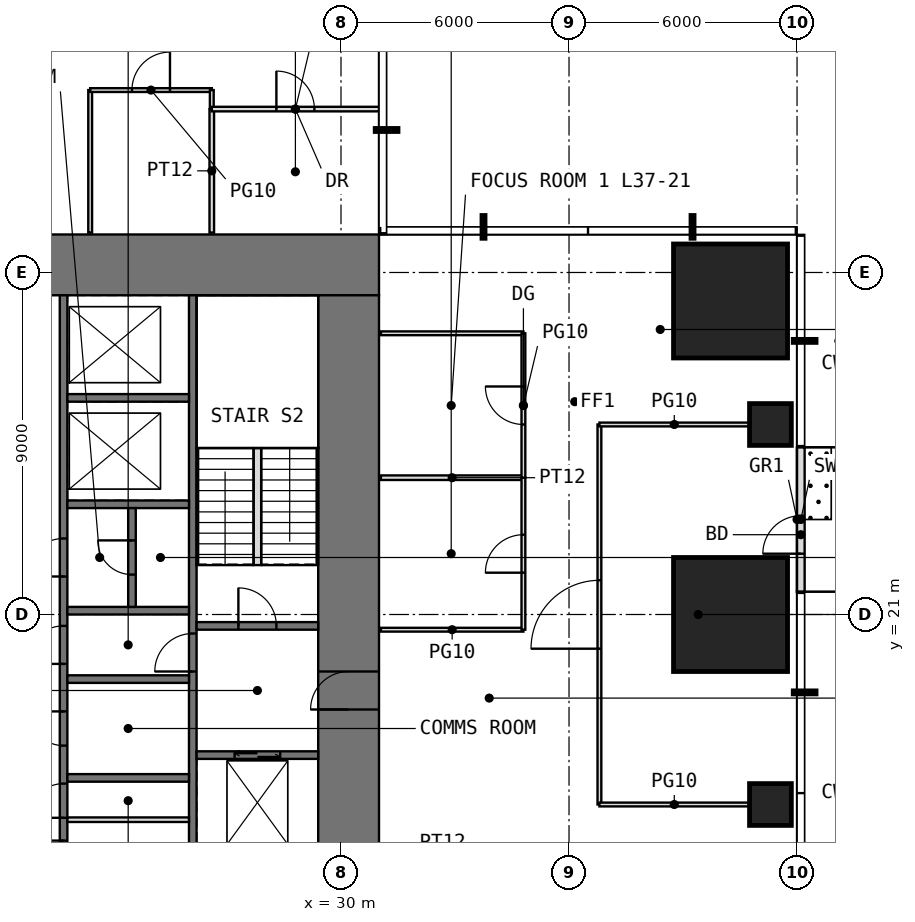
"""IFC4 building model, lengths in metres.
Left out: names, types, materials, properties, quantities, classifications, styles, units other than length and angle.
Written with IfcOpenShell. Run it as: python <this file> out.ifc"""

import sys

from ifc_helpers import new_model, si_unit, direction, frame, frame_2d, origin, origin_2d, place, context, subcontext, project, spatial, rectangle, extrude, element, fill, save


model = new_model("IFC4")
c1 = context("Model", 3, precision=1e-05, world=origin(), true_north=direction((0.0, 1.0)))
c2 = subcontext(c1, "Body", "Model", "MODEL_VIEW")
j1 = project(units=[si_unit("LENGTHUNIT", "METRE"), si_unit("PLANEANGLEUNIT", "RADIAN")], contexts=[c1])
p1 = place(None, origin())
s1 = spatial("IfcSite", under=j1, at=p1, CompositionType="ELEMENT")
p2 = place(p1, origin())
s2 = spatial("IfcBuilding", under=s1, at=p2, CompositionType="ELEMENT")
p3 = place(p2, frame((0.0, 0.0, 156.5)))
s3 = spatial("IfcBuildingStorey", under=s2, at=p3, CompositionType="ELEMENT", Elevation=156.5)
p4 = place(p3, frame((41.3, 16.0, 0.0), z_axis=(0.0, 0.0, 1.0), x_axis=(1.0, 0.0, 0.0)))
e1 = element("IfcColumn", 1, at=p4, inside=s3, PredefinedType="COLUMN", context=c2, shape_type="SweptSolid", body=[
    extrude(rectangle(XDim=1.1, YDim=1.1, at=origin_2d()), origin(), (0.0, 0.0, 1.0), 4.0),
])
p5 = place(p3, frame((40.25, 21.0, 0.0), z_axis=(0.0, 0.0, 1.0), x_axis=(1.0, 0.0, 0.0)))
e2 = element("IfcColumn", 2, at=p5, inside=s3, PredefinedType="COLUMN", context=c2, shape_type="SweptSolid", body=[
    extrude(rectangle(XDim=3.0, YDim=3.0, at=origin_2d()), origin(), (0.0, 0.0, 1.0), 4.0),
])
p6 = place(p3, frame((41.3, 26.0, 0.0), z_axis=(0.0, 0.0, 1.0), x_axis=(1.0, 0.0, 0.0)))
e3 = element("IfcColumn", 3, at=p6, inside=s3, PredefinedType="COLUMN", context=c2, shape_type="SweptSolid", body=[
    extrude(rectangle(XDim=1.1, YDim=1.1, at=origin_2d()), origin(), (0.0, 0.0, 1.0), 4.0),
])
p7 = place(p3, frame((40.25, 29.25, 0.0), z_axis=(0.0, 0.0, 1.0), x_axis=(1.0, 0.0, 0.0)))
e4 = element("IfcColumn", 4, at=p7, inside=s3, PredefinedType="COLUMN", context=c2, shape_type="SweptSolid", body=[
    extrude(rectangle(XDim=3.0, YDim=3.0, at=origin_2d()), origin(), (0.0, 0.0, 1.0), 4.0),
])
p8 = place(p3, frame((42.1, 21.6, 0.0), z_axis=(0.0, 0.0, 1.0), x_axis=(0.0, 1.0, 0.0)))
e5 = element("IfcWall", 5, at=p8, inside=s3, PredefinedType="USERDEFINED", context=c2, shape_type="SweptSolid", body=[
    extrude(rectangle(XDim=3.8, YDim=0.2, at=frame_2d((1.9, 0.0))), origin(), (0.0, 0.0, 1.0), 3.55),
])
p9 = place(p8, frame((1.0, 0.0, 0.0)))
e6 = element("IfcOpeningElement", 6, at=p9, cuts=e5, PredefinedType="OPENING", context=c2, shape_type="SweptSolid", body=[
    extrude(rectangle(XDim=1.0, YDim=2.4, at=frame_2d((0.5, 1.2))), frame((0.0, 0.11, 0.0), z_axis=(0.0, -1.0, 0.0), x_axis=(1.0, 0.0, 0.0)), (0.0, 0.0, 1.0), 0.22),
])
p10 = place(p3, frame((11.0, 30.2, -0.05), z_axis=(0.0, 0.0, 1.0), x_axis=(1.0, 0.0, 0.0)))
e7 = element("IfcWall", 7, at=p10, inside=s3, PredefinedType="SHEAR", context=c2, shape_type="SweptSolid", body=[
    extrude(rectangle(XDim=20.0, YDim=1.6, at=frame_2d((10.0, 0.0))), origin(), (0.0, 0.0, 1.0), 3.8),
])
p11 = place(p10, frame((9.0, 0.0, 0.05)))
e8 = element("IfcOpeningElement", 8, at=p11, cuts=e7, PredefinedType="OPENING", context=c2, shape_type="SweptSolid", body=[
    extrude(rectangle(XDim=2.0, YDim=2.2, at=frame_2d((1.0, 1.1))), frame((0.0, 0.81, 0.0), z_axis=(0.0, -1.0, 0.0), x_axis=(1.0, 0.0, 0.0)), (0.0, 0.0, 1.0), 1.62),
])
p12 = place(p3, frame((30.2, 12.6, -0.05), z_axis=(0.0, 0.0, 1.0), x_axis=(0.0, 1.0, 0.0)))
e9 = element("IfcWall", 9, at=p12, inside=s3, PredefinedType="SHEAR", context=c2, shape_type="SweptSolid", body=[
    extrude(rectangle(XDim=16.8, YDim=1.6, at=frame_2d((8.4, 0.0))), origin(), (0.0, 0.0, 1.0), 3.8),
])
p13 = place(p12, frame((5.9, 0.0, 0.05)))
e10 = element("IfcOpeningElement", 10, at=p13, cuts=e9, PredefinedType="OPENING", context=c2, shape_type="SweptSolid", body=[
    extrude(rectangle(XDim=1.0, YDim=2.2, at=frame_2d((0.5, 1.1))), frame((0.0, 0.81, 0.0), z_axis=(0.0, -1.0, 0.0), x_axis=(1.0, 0.0, 0.0)), (0.0, 0.0, 1.0), 1.62),
])
p14 = place(p3, frame((22.7, 12.6, -0.05), z_axis=(0.0, 0.0, 1.0), x_axis=(0.0, 1.0, 0.0)))
e11 = element("IfcWall", 11, at=p14, inside=s3, PredefinedType="SHEAR", context=c2, shape_type="SweptSolid", body=[
    extrude(rectangle(XDim=16.8, YDim=0.2, at=frame_2d((8.4, 0.0))), origin(), (0.0, 0.0, 1.0), 3.8),
])
p15 = place(p14, frame((3.05, 0.0, 0.05)))
e12 = element("IfcOpeningElement", 12, at=p15, cuts=e11, PredefinedType="OPENING", context=c2, shape_type="SweptSolid", body=[
    extrude(rectangle(XDim=0.9, YDim=2.2, at=frame_2d((0.45, 1.1))), frame((0.0, 0.11, 0.0), z_axis=(0.0, -1.0, 0.0), x_axis=(1.0, 0.0, 0.0)), (0.0, 0.0, 1.0), 0.22),
])
p16 = place(p14, frame((7.1, 0.0, 0.05)))
e13 = element("IfcOpeningElement", 13, at=p16, cuts=e11, PredefinedType="OPENING", context=c2, shape_type="SweptSolid", body=[
    extrude(rectangle(XDim=1.0, YDim=2.2, at=frame_2d((0.5, 1.1))), frame((0.0, 0.11, 0.0), z_axis=(0.0, -1.0, 0.0), x_axis=(1.0, 0.0, 0.0)), (0.0, 0.0, 1.0), 0.22),
])
p17 = place(p14, frame((1.55, 0.0, 0.05)))
e14 = element("IfcOpeningElement", 14, at=p17, cuts=e11, PredefinedType="OPENING", context=c2, shape_type="SweptSolid", body=[
    extrude(rectangle(XDim=0.9, YDim=2.2, at=frame_2d((0.45, 1.1))), frame((0.0, 0.11, 0.0), z_axis=(0.0, -1.0, 0.0), x_axis=(1.0, 0.0, 0.0)), (0.0, 0.0, 1.0), 0.22),
])
p18 = place(p14, frame((4.95, 0.0, 0.05)))
e15 = element("IfcOpeningElement", 15, at=p18, cuts=e11, PredefinedType="OPENING", context=c2, shape_type="SweptSolid", body=[
    extrude(rectangle(XDim=0.9, YDim=2.2, at=frame_2d((0.45, 1.1))), frame((0.0, 0.11, 0.0), z_axis=(0.0, -1.0, 0.0), x_axis=(1.0, 0.0, 0.0)), (0.0, 0.0, 1.0), 0.22),
])
p19 = place(p14, frame((9.4, 0.0, 0.05)))
e16 = element("IfcOpeningElement", 16, at=p19, cuts=e11, PredefinedType="OPENING", context=c2, shape_type="SweptSolid", body=[
    extrude(rectangle(XDim=1.0, YDim=2.2, at=frame_2d((0.5, 1.1))), frame((0.0, 0.11, 0.0), z_axis=(0.0, -1.0, 0.0), x_axis=(1.0, 0.0, 0.0)), (0.0, 0.0, 1.0), 0.22),
])
p20 = place(p3, frame((26.1, 12.6, -0.05), z_axis=(0.0, 0.0, 1.0), x_axis=(0.0, 1.0, 0.0)))
e17 = element("IfcWall", 17, at=p20, inside=s3, PredefinedType="SHEAR", context=c2, shape_type="SweptSolid", body=[
    extrude(rectangle(XDim=16.8, YDim=0.2, at=frame_2d((8.4, 0.0))), origin(), (0.0, 0.0, 1.0), 3.8),
])
p21 = place(p20, frame((6.9, 0.0, 0.05)))
e18 = element("IfcOpeningElement", 18, at=p21, cuts=e17, PredefinedType="OPENING", context=c2, shape_type="SweptSolid", body=[
    extrude(rectangle(XDim=1.0, YDim=2.2, at=frame_2d((0.5, 1.1))), frame((0.0, 0.11, 0.0), z_axis=(0.0, -1.0, 0.0), x_axis=(1.0, 0.0, 0.0)), (0.0, 0.0, 1.0), 0.22),
])
for number, where, z_axis, x_axis in (
    (19, (22.8, 16.7, -0.05), (0.0, 0.0, 1.0), (1.0, 0.0, 0.0)),
    (20, (22.8, 19.3, -0.05), (0.0, 0.0, 1.0), (1.0, 0.0, 0.0)),
    (21, (22.8, 21.1, -0.05), (0.0, 0.0, 1.0), (1.0, 0.0, 0.0)),
    (22, (22.8, 23.9, -0.05), (0.0, 0.0, 1.0), (1.0, 0.0, 0.0)),
    (23, (22.8, 26.7, -0.05), (0.0, 0.0, 1.0), (1.0, 0.0, 0.0)),
):
    element("IfcWall", number, at=place(p3, frame(where, z_axis=z_axis, x_axis=x_axis)), inside=s3, PredefinedType="SHEAR", context=c2, shape_type="SweptSolid", body=[
        extrude(rectangle(XDim=3.2, YDim=0.2, at=frame_2d((1.6, 0.0))), origin(), (0.0, 0.0, 1.0), 3.8),
    ])
p22 = place(p3, frame((26.2, 17.3, -0.05), z_axis=(0.0, 0.0, 1.0), x_axis=(1.0, 0.0, 0.0)))
e24 = element("IfcWall", 24, at=p22, inside=s3, PredefinedType="SHEAR", context=c2, shape_type="SweptSolid", body=[
    extrude(rectangle(XDim=3.2, YDim=0.2, at=frame_2d((1.6, 0.0))), origin(), (0.0, 0.0, 1.0), 3.8),
])
p23 = place(p22, frame((1.0, 0.0, 0.05)))
e25 = element("IfcOpeningElement", 25, at=p23, cuts=e24, PredefinedType="OPENING", context=c2, shape_type="SweptSolid", body=[
    extrude(rectangle(XDim=1.2, YDim=2.2, at=frame_2d((0.6, 1.1))), frame((0.0, 0.11, 0.0), z_axis=(0.0, -1.0, 0.0), x_axis=(1.0, 0.0, 0.0)), (0.0, 0.0, 1.0), 0.22),
])
p24 = place(p3, frame((26.2, 20.7, -0.05), z_axis=(0.0, 0.0, 1.0), x_axis=(1.0, 0.0, 0.0)))
e26 = element("IfcWall", 26, at=p24, inside=s3, PredefinedType="SHEAR", context=c2, shape_type="SweptSolid", body=[
    extrude(rectangle(XDim=3.2, YDim=0.2, at=frame_2d((1.6, 0.0))), origin(), (0.0, 0.0, 1.0), 3.8),
])
p25 = place(p24, frame((1.1, 0.0, 0.05)))
e27 = element("IfcOpeningElement", 27, at=p25, cuts=e26, PredefinedType="OPENING", context=c2, shape_type="SweptSolid", body=[
    extrude(rectangle(XDim=1.0, YDim=2.2, at=frame_2d((0.5, 1.1))), frame((0.0, 0.11, 0.0), z_axis=(0.0, -1.0, 0.0), x_axis=(1.0, 0.0, 0.0)), (0.0, 0.0, 1.0), 0.22),
])
p26 = place(p3, frame((22.8, 15.6, 0.0), z_axis=(0.0, 0.0, 1.0), x_axis=(1.0, 0.0, 0.0)))
e28 = element("IfcWall", 28, at=p26, inside=s3, PredefinedType="PARTITIONING", context=c2, shape_type="SweptSolid", body=[
    extrude(rectangle(XDim=3.2, YDim=0.12, at=frame_2d((1.6, 0.0))), origin(), (0.0, 0.0, 1.0), 3.55),
])
p27 = place(p3, frame((24.5, 21.2, -0.05), z_axis=(0.0, 0.0, 1.0), x_axis=(0.0, 1.0, 0.0)))
e29 = element("IfcWall", 29, at=p27, inside=s3, PredefinedType="SHEAR", context=c2, shape_type="SweptSolid", body=[
    extrude(rectangle(XDim=2.6, YDim=0.2, at=frame_2d((1.3, 0.0))), origin(), (0.0, 0.0, 1.0), 3.8),
])
p28 = place(p27, frame((0.85, 0.0, 0.05)))
e30 = element("IfcOpeningElement", 30, at=p28, cuts=e29, PredefinedType="OPENING", context=c2, shape_type="SweptSolid", body=[
    extrude(rectangle(XDim=0.9, YDim=2.2, at=frame_2d((0.45, 1.1))), frame((0.0, 0.11, 0.0), z_axis=(0.0, -1.0, 0.0), x_axis=(1.0, 0.0, 0.0)), (0.0, 0.0, 1.0), 0.22),
])
p29 = place(p3, frame((23.4, 31.05, 0.0), z_axis=(0.0, 0.0, 1.0), x_axis=(0.0, 1.0, 0.0)))
e31 = element("IfcWall", 31, at=p29, inside=s3, PredefinedType="PARTITIONING", context=c2, shape_type="SweptSolid", body=[
    extrude(rectangle(XDim=3.75, YDim=0.1, at=frame_2d((1.875, 0.0))), origin(), (0.0, 0.0, 1.0), 3.55),
])
p30 = place(p3, frame((23.4, 34.8, 0.0), z_axis=(0.0, 0.0, 1.0), x_axis=(1.0, 0.0, 0.0)))
e32 = element("IfcWall", 32, at=p30, inside=s3, PredefinedType="PARTITIONING", context=c2, shape_type="SweptSolid", body=[
    extrude(rectangle(XDim=3.2, YDim=0.1, at=frame_2d((1.6, 0.0))), origin(), (0.0, 0.0, 1.0), 3.55),
])
p31 = place(p30, frame((1.1, 0.0, 0.0)))
e33 = element("IfcOpeningElement", 33, at=p31, cuts=e32, PredefinedType="OPENING", context=c2, shape_type="SweptSolid", body=[
    extrude(rectangle(XDim=1.0, YDim=2.4, at=frame_2d((0.5, 1.2))), frame((0.0, 0.06, 0.0), z_axis=(0.0, -1.0, 0.0), x_axis=(1.0, 0.0, 0.0)), (0.0, 0.0, 1.0), 0.12),
])
p32 = place(p3, frame((26.6, 31.05, 0.0), z_axis=(0.0, 0.0, 1.0), x_axis=(0.0, 1.0, 0.0)))
e34 = element("IfcWall", 34, at=p32, inside=s3, PredefinedType="PARTITIONING", context=c2, shape_type="SweptSolid", body=[
    extrude(rectangle(XDim=3.25, YDim=0.12, at=frame_2d((1.625, 0.0))), origin(), (0.0, 0.0, 1.0), 3.55),
])
p33 = place(p3, frame((26.6, 34.3, 0.0), z_axis=(0.0, 0.0, 1.0), x_axis=(0.0, 1.0, 0.0)))
e35 = element("IfcWall", 35, at=p33, inside=s3, PredefinedType="PARTITIONING", context=c2, shape_type="SweptSolid", body=[
    extrude(rectangle(XDim=0.5, YDim=0.1, at=frame_2d((0.25, 0.0))), origin(), (0.0, 0.0, 1.0), 3.55),
])
p34 = place(p3, frame((26.6, 34.3, 0.0), z_axis=(0.0, 0.0, 1.0), x_axis=(1.0, 0.0, 0.0)))
e36 = element("IfcWall", 36, at=p34, inside=s3, PredefinedType="PARTITIONING", context=c2, shape_type="SweptSolid", body=[
    extrude(rectangle(XDim=4.4, YDim=0.12, at=frame_2d((2.2, 0.0))), origin(), (0.0, 0.0, 1.0), 3.55),
])
p35 = place(p34, frame((1.7, 0.0, 0.0)))
e37 = element("IfcOpeningElement", 37, at=p35, cuts=e36, PredefinedType="OPENING", context=c2, shape_type="SweptSolid", body=[
    extrude(rectangle(XDim=1.0, YDim=2.2, at=frame_2d((0.5, 1.1))), frame((0.0, 0.07, 0.0), z_axis=(0.0, -1.0, 0.0), x_axis=(1.0, 0.0, 0.0)), (0.0, 0.0, 1.0), 0.14),
])
p36 = place(p3, frame((31.05, 20.6, 0.0), z_axis=(0.0, 0.0, 1.0), x_axis=(1.0, 0.0, 0.0)))
e38 = element("IfcWall", 38, at=p36, inside=s3, PredefinedType="PARTITIONING", context=c2, shape_type="SweptSolid", body=[
    extrude(rectangle(XDim=3.75, YDim=0.1, at=frame_2d((1.875, 0.0))), origin(), (0.0, 0.0, 1.0), 3.55),
])
p37 = place(p3, frame((31.05, 24.6, 0.0), z_axis=(0.0, 0.0, 1.0), x_axis=(1.0, 0.0, 0.0)))
e39 = element("IfcWall", 39, at=p37, inside=s3, PredefinedType="PARTITIONING", context=c2, shape_type="SweptSolid", body=[
    extrude(rectangle(XDim=3.75, YDim=0.12, at=frame_2d((1.875, 0.0))), origin(), (0.0, 0.0, 1.0), 3.55),
])
p38 = place(p3, frame((31.05, 28.4, 0.0), z_axis=(0.0, 0.0, 1.0), x_axis=(1.0, 0.0, 0.0)))
e40 = element("IfcWall", 40, at=p38, inside=s3, PredefinedType="PARTITIONING", context=c2, shape_type="SweptSolid", body=[
    extrude(rectangle(XDim=3.75, YDim=0.1, at=frame_2d((1.875, 0.0))), origin(), (0.0, 0.0, 1.0), 3.55),
])
p39 = place(p3, frame((34.8, 20.6, 0.0), z_axis=(0.0, 0.0, 1.0), x_axis=(0.0, 1.0, 0.0)))
e41 = element("IfcWall", 41, at=p39, inside=s3, PredefinedType="PARTITIONING", context=c2, shape_type="SweptSolid", body=[
    extrude(rectangle(XDim=4.0, YDim=0.1, at=frame_2d((2.0, 0.0))), origin(), (0.0, 0.0, 1.0), 3.55),
])
p40 = place(p39, frame((1.5, 0.0, 0.0)))
e42 = element("IfcOpeningElement", 42, at=p40, cuts=e41, PredefinedType="OPENING", context=c2, shape_type="SweptSolid", body=[
    extrude(rectangle(XDim=1.0, YDim=2.4, at=frame_2d((0.5, 1.2))), frame((0.0, 0.06, 0.0), z_axis=(0.0, -1.0, 0.0), x_axis=(1.0, 0.0, 0.0)), (0.0, 0.0, 1.0), 0.12),
])
p41 = place(p3, frame((34.8, 24.6, 0.0), z_axis=(0.0, 0.0, 1.0), x_axis=(0.0, 1.0, 0.0)))
e43 = element("IfcWall", 43, at=p41, inside=s3, PredefinedType="PARTITIONING", context=c2, shape_type="SweptSolid", body=[
    extrude(rectangle(XDim=3.8, YDim=0.1, at=frame_2d((1.9, 0.0))), origin(), (0.0, 0.0, 1.0), 3.55),
])
p42 = place(p41, frame((1.4, 0.0, 0.0)))
e44 = element("IfcOpeningElement", 44, at=p42, cuts=e43, PredefinedType="OPENING", context=c2, shape_type="SweptSolid", body=[
    extrude(rectangle(XDim=1.0, YDim=2.4, at=frame_2d((0.5, 1.2))), frame((0.0, 0.06, 0.0), z_axis=(0.0, -1.0, 0.0), x_axis=(1.0, 0.0, 0.0)), (0.0, 0.0, 1.0), 0.12),
])
p43 = place(p3, frame((36.8, 16.0, 0.0), z_axis=(0.0, 0.0, 1.0), x_axis=(0.0, 1.0, 0.0)))
e45 = element("IfcWall", 45, at=p43, inside=s3, PredefinedType="PARTITIONING", context=c2, shape_type="SweptSolid", body=[
    extrude(rectangle(XDim=10.0, YDim=0.1, at=frame_2d((5.0, 0.0))), origin(), (0.0, 0.0, 1.0), 3.55),
])
p44 = place(p43, frame((4.1, 0.0, 0.0)))
e46 = element("IfcOpeningElement", 46, at=p44, cuts=e45, PredefinedType="OPENING", context=c2, shape_type="SweptSolid", body=[
    extrude(rectangle(XDim=1.8, YDim=2.4, at=frame_2d((0.9, 1.2))), frame((0.0, 0.06, 0.0), z_axis=(0.0, -1.0, 0.0), x_axis=(1.0, 0.0, 0.0)), (0.0, 0.0, 1.0), 0.12),
])
for number, where, z_axis, x_axis in (
    (47, (36.8, 16.0, 0.0), (0.0, 0.0, 1.0), (1.0, 0.0, 0.0)),
    (48, (36.8, 26.0, 0.0), (0.0, 0.0, 1.0), (1.0, 0.0, 0.0)),
):
    element("IfcWall", number, at=place(p3, frame(where, z_axis=z_axis, x_axis=x_axis)), inside=s3, PredefinedType="PARTITIONING", context=c2, shape_type="SweptSolid", body=[
        extrude(rectangle(XDim=3.94, YDim=0.1, at=frame_2d((1.97, 0.0))), origin(), (0.0, 0.0, 1.0), 2.736),
    ])
p45 = place(p3, frame((27.8, 22.3, 0.0), z_axis=(0.0, 0.0, 1.0), x_axis=(0.0, 1.0, 0.0)))
e49 = element("IfcWall", 49, at=p45, inside=s3, PredefinedType="PARTITIONING", context=c2, shape_type="SweptSolid", body=[
    extrude(rectangle(XDim=3.08, YDim=0.2, at=frame_2d((1.54, 0.0))), origin(), (0.0, 0.0, 1.0), 4.0),
])
p46 = place(p9, origin())
e50 = element("IfcDoor", 50, at=p46, inside=s3, OperationType="SINGLE_SWING_LEFT", PredefinedType="DOOR", context=c2, shape_type="SweptSolid", body=[
    extrude(rectangle(XDim=1.0, YDim=2.4, at=frame_2d((0.5, 1.2))), frame((0.0, 0.025, 0.0), z_axis=(0.0, -1.0, 0.0), x_axis=(1.0, 0.0, 0.0)), (0.0, 0.0, 1.0), 0.05),
])
fill(e6, e50)
p47 = place(p15, origin())
e51 = element("IfcDoor", 51, at=p47, inside=s3, OperationType="SINGLE_SWING_LEFT", PredefinedType="DOOR", context=c2, shape_type="SweptSolid", body=[
    extrude(rectangle(XDim=0.9, YDim=2.2, at=frame_2d((0.45, 1.1))), frame((0.0, 0.025, 0.0), z_axis=(0.0, -1.0, 0.0), x_axis=(1.0, 0.0, 0.0)), (0.0, 0.0, 1.0), 0.05),
])
fill(e12, e51)
p48 = place(p13, origin())
e52 = element("IfcDoor", 52, at=p48, inside=s3, OperationType="SINGLE_SWING_LEFT", PredefinedType="DOOR", context=c2, shape_type="SweptSolid", body=[
    extrude(rectangle(XDim=1.0, YDim=2.2, at=frame_2d((0.5, 1.1))), frame((0.0, 0.025, 0.0), z_axis=(0.0, -1.0, 0.0), x_axis=(1.0, 0.0, 0.0)), (0.0, 0.0, 1.0), 0.05),
])
fill(e10, e52)
p49 = place(p25, origin())
e53 = element("IfcDoor", 53, at=p49, inside=s3, OperationType="SINGLE_SWING_LEFT", PredefinedType="DOOR", context=c2, shape_type="SweptSolid", body=[
    extrude(rectangle(XDim=1.0, YDim=2.2, at=frame_2d((0.5, 1.1))), frame((0.0, 0.025, 0.0), z_axis=(0.0, -1.0, 0.0), x_axis=(1.0, 0.0, 0.0)), (0.0, 0.0, 1.0), 0.05),
])
fill(e27, e53)
p50 = place(p21, origin())
e54 = element("IfcDoor", 54, at=p50, inside=s3, OperationType="SINGLE_SWING_LEFT", PredefinedType="DOOR", context=c2, shape_type="SweptSolid", body=[
    extrude(rectangle(XDim=1.0, YDim=2.2, at=frame_2d((0.5, 1.1))), frame((0.0, 0.025, 0.0), z_axis=(0.0, -1.0, 0.0), x_axis=(1.0, 0.0, 0.0)), (0.0, 0.0, 1.0), 0.05),
])
fill(e18, e54)
p51 = place(p16, origin())
e55 = element("IfcDoor", 55, at=p51, inside=s3, OperationType="SINGLE_SWING_LEFT", PredefinedType="DOOR", context=c2, shape_type="SweptSolid", body=[
    extrude(rectangle(XDim=1.0, YDim=2.2, at=frame_2d((0.5, 1.1))), frame((0.0, 0.025, 0.0), z_axis=(0.0, -1.0, 0.0), x_axis=(1.0, 0.0, 0.0)), (0.0, 0.0, 1.0), 0.05),
])
fill(e13, e55)
p52 = place(p17, origin())
e56 = element("IfcDoor", 56, at=p52, inside=s3, OperationType="SINGLE_SWING_RIGHT", PredefinedType="DOOR", context=c2, shape_type="SweptSolid", body=[
    extrude(rectangle(XDim=0.9, YDim=2.2, at=frame_2d((0.45, 1.1))), frame((0.0, 0.025, 0.0), z_axis=(0.0, -1.0, 0.0), x_axis=(1.0, 0.0, 0.0)), (0.0, 0.0, 1.0), 0.05),
])
fill(e14, e56)
p53 = place(p18, origin())
e57 = element("IfcDoor", 57, at=p53, inside=s3, OperationType="SINGLE_SWING_RIGHT", PredefinedType="DOOR", context=c2, shape_type="SweptSolid", body=[
    extrude(rectangle(XDim=0.9, YDim=2.2, at=frame_2d((0.45, 1.1))), frame((0.0, 0.025, 0.0), z_axis=(0.0, -1.0, 0.0), x_axis=(1.0, 0.0, 0.0)), (0.0, 0.0, 1.0), 0.05),
])
fill(e15, e57)
p54 = place(p19, origin())
e58 = element("IfcDoor", 58, at=p54, inside=s3, OperationType="SINGLE_SWING_LEFT", PredefinedType="DOOR", context=c2, shape_type="SweptSolid", body=[
    extrude(rectangle(XDim=1.0, YDim=2.2, at=frame_2d((0.5, 1.1))), frame((0.0, 0.025, 0.0), z_axis=(0.0, -1.0, 0.0), x_axis=(1.0, 0.0, 0.0)), (0.0, 0.0, 1.0), 0.05),
])
fill(e16, e58)
p55 = place(p28, origin())
e59 = element("IfcDoor", 59, at=p55, inside=s3, OperationType="SINGLE_SWING_RIGHT", PredefinedType="DOOR", context=c2, shape_type="SweptSolid", body=[
    extrude(rectangle(XDim=0.9, YDim=2.2, at=frame_2d((0.45, 1.1))), frame((0.0, 0.025, 0.0), z_axis=(0.0, -1.0, 0.0), x_axis=(1.0, 0.0, 0.0)), (0.0, 0.0, 1.0), 0.05),
])
fill(e30, e59)
p56 = place(p40, origin())
e60 = element("IfcDoor", 60, at=p56, inside=s3, OperationType="SINGLE_SWING_LEFT", PredefinedType="DOOR", context=c2, shape_type="SweptSolid", body=[
    extrude(rectangle(XDim=1.0, YDim=2.4, at=frame_2d((0.5, 1.2))), frame((0.0, 0.025, 0.0), z_axis=(0.0, -1.0, 0.0), x_axis=(1.0, 0.0, 0.0)), (0.0, 0.0, 1.0), 0.05),
])
fill(e42, e60)
p57 = place(p42, origin())
e61 = element("IfcDoor", 61, at=p57, inside=s3, OperationType="SINGLE_SWING_RIGHT", PredefinedType="DOOR", context=c2, shape_type="SweptSolid", body=[
    extrude(rectangle(XDim=1.0, YDim=2.4, at=frame_2d((0.5, 1.2))), frame((0.0, 0.025, 0.0), z_axis=(0.0, -1.0, 0.0), x_axis=(1.0, 0.0, 0.0)), (0.0, 0.0, 1.0), 0.05),
])
fill(e44, e61)
p58 = place(p44, origin())
e62 = element("IfcDoor", 62, at=p58, inside=s3, OperationType="DOUBLE_DOOR_SINGLE_SWING", PredefinedType="DOOR", context=c2, shape_type="SweptSolid", body=[
    extrude(rectangle(XDim=1.8, YDim=2.4, at=frame_2d((0.9, 1.2))), frame((0.0, 0.025, 0.0), z_axis=(0.0, -1.0, 0.0), x_axis=(1.0, 0.0, 0.0)), (0.0, 0.0, 1.0), 0.05),
])
fill(e46, e62)
p59 = place(p31, origin())
e63 = element("IfcDoor", 63, at=p59, inside=s3, OperationType="SINGLE_SWING_RIGHT", PredefinedType="DOOR", context=c2, shape_type="SweptSolid", body=[
    extrude(rectangle(XDim=1.0, YDim=2.4, at=frame_2d((0.5, 1.2))), frame((0.0, 0.025, 0.0), z_axis=(0.0, -1.0, 0.0), x_axis=(1.0, 0.0, 0.0)), (0.0, 0.0, 1.0), 0.05),
])
fill(e33, e63)
p60 = place(p35, origin())
e64 = element("IfcDoor", 64, at=p60, inside=s3, OperationType="SINGLE_SWING_LEFT", PredefinedType="DOOR", context=c2, shape_type="SweptSolid", body=[
    extrude(rectangle(XDim=1.0, YDim=2.2, at=frame_2d((0.5, 1.1))), frame((0.0, 0.025, 0.0), z_axis=(0.0, -1.0, 0.0), x_axis=(1.0, 0.0, 0.0)), (0.0, 0.0, 1.0), 0.05),
])
fill(e37, e64)
p61 = place(p23, origin())
e65 = element("IfcDoor", 65, at=p61, inside=s3, OperationType="DOUBLE_DOOR_SLIDING", PredefinedType="DOOR", context=c2, shape_type="SweptSolid", body=[
    extrude(rectangle(XDim=1.2, YDim=2.2, at=frame_2d((0.6, 1.1))), frame((0.0, 0.025, 0.0), z_axis=(0.0, -1.0, 0.0), x_axis=(1.0, 0.0, 0.0)), (0.0, 0.0, 1.0), 0.05),
])
fill(e25, e65)
save(model, sys.argv[1])
